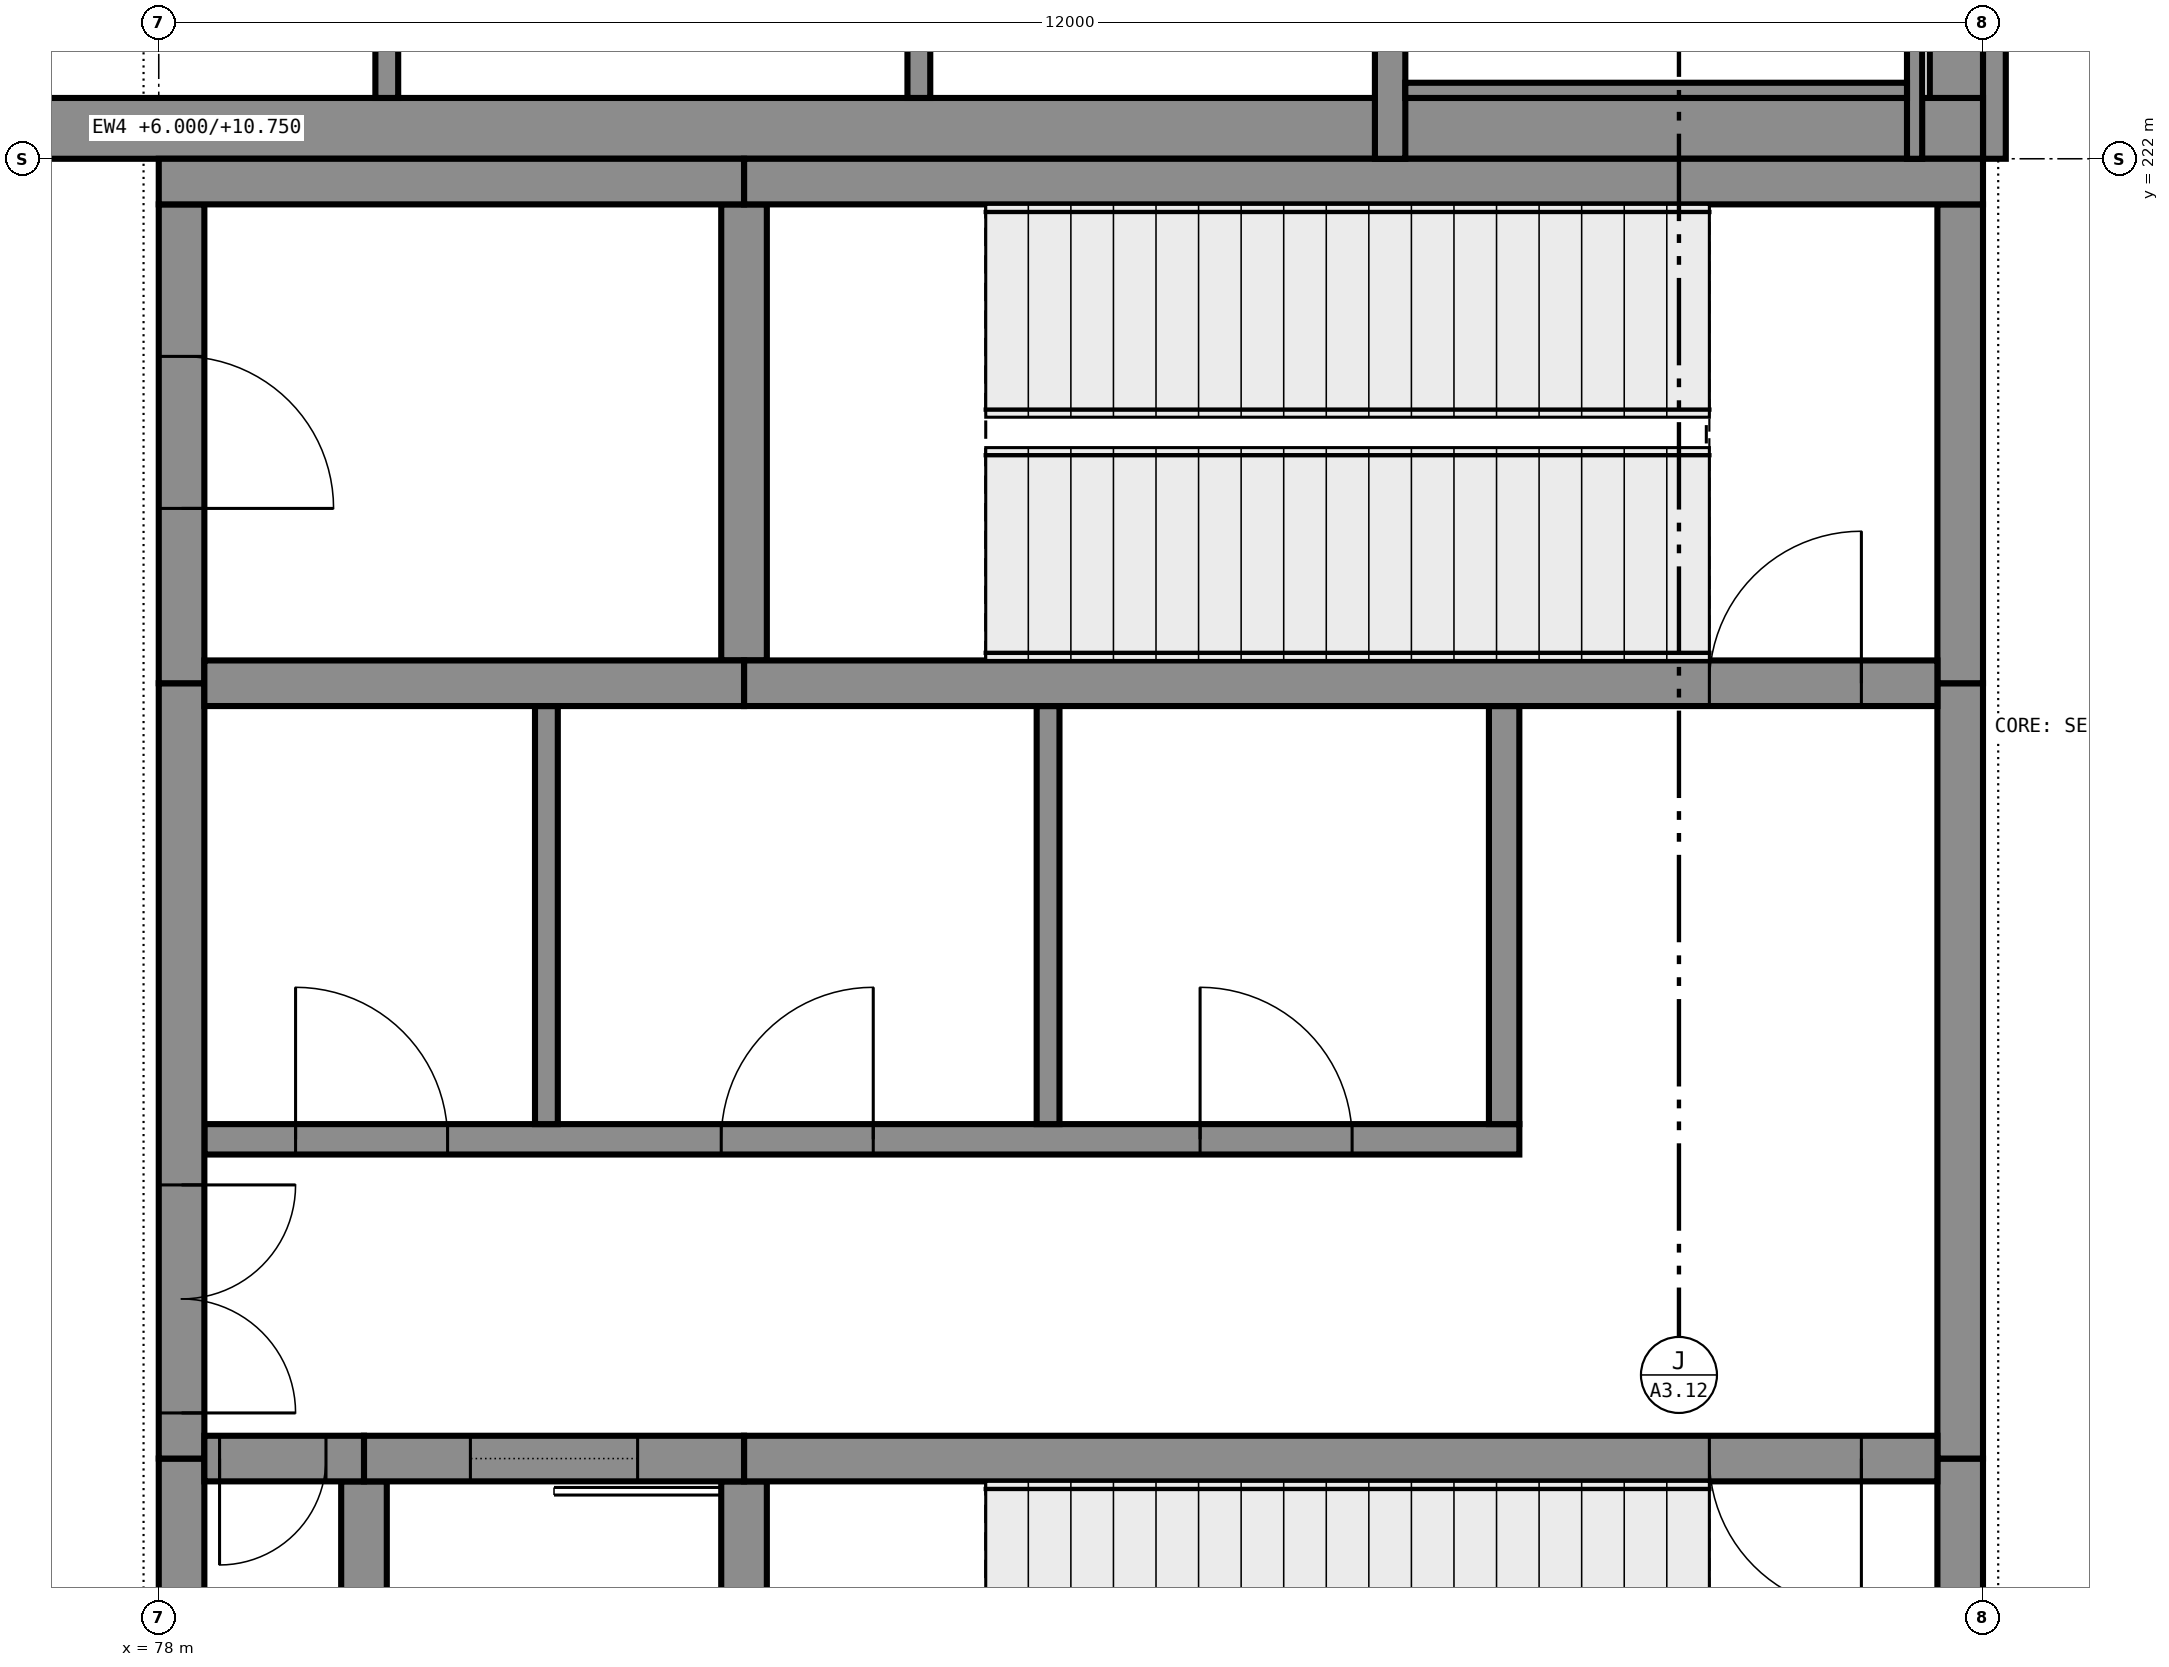
"""IFC4 building model, lengths in metres.
Left out: names, types, materials, properties, quantities, classifications, styles, units other than length and angle.
Written with IfcOpenShell. Run it as: python <this file> out.ifc"""

import sys

from ifc_helpers import new_model, si_unit, direction, frame, frame_2d, origin, place, context, subcontext, project, spatial, rectangle, extrude, element, fill, save


model = new_model("IFC4")
c1 = context("Model", 3, precision=1e-05, world=origin(), true_north=direction((0.0, 1.0)))
c2 = subcontext(c1, "Body", "Model", "MODEL_VIEW")
j1 = project(units=[si_unit("LENGTHUNIT", "METRE"), si_unit("PLANEANGLEUNIT", "RADIAN")], contexts=[c1])
p1 = place(None, origin())
s1 = spatial("IfcSite", under=j1, at=p1, CompositionType="ELEMENT")
p2 = place(p1, origin())
s2 = spatial("IfcBuilding", under=s1, at=p2, CompositionType="ELEMENT")
p3 = place(p2, frame((0.0, 0.0, 6.0)))
s3 = spatial("IfcBuildingStorey", under=s2, at=p3, CompositionType="ELEMENT", Elevation=6.0)
p4 = place(p3, frame((90.0, 221.85, 0.0), z_axis=(0.0, 0.0, 1.0), x_axis=(-1.0, 0.0, 0.0)))
e1 = element("IfcWall", 1, at=p4, inside=s3, PredefinedType="SHEAR", context=c2, shape_type="SweptSolid", body=[
    extrude(rectangle(XDim=8.15, YDim=0.3, at=frame_2d((4.075, 0.0))), origin(), (0.0, 0.0, 1.0), 5.75),
])
p5 = place(p3, frame((81.85, 221.85, 0.0), z_axis=(0.0, 0.0, 1.0), x_axis=(-1.0, 0.0, 0.0)))
e2 = element("IfcWall", 2, at=p5, inside=s3, PredefinedType="SHEAR", context=c2, shape_type="SweptSolid", body=[
    extrude(rectangle(XDim=3.85, YDim=0.3, at=frame_2d((1.925, 0.0))), origin(), (0.0, 0.0, 1.0), 5.75),
])
p6 = place(p3, frame((89.7, 213.45, 0.0), z_axis=(0.0, 0.0, 1.0), x_axis=(-1.0, 0.0, 0.0)))
e3 = element("IfcWall", 3, at=p6, inside=s3, PredefinedType="SHEAR", context=c2, shape_type="SweptSolid", body=[
    extrude(rectangle(XDim=7.85, YDim=0.3, at=frame_2d((3.925, 0.0))), origin(), (0.0, 0.0, 1.0), 5.75),
])
p7 = place(p6, frame((0.5, 0.0, 0.0)))
e4 = element("IfcOpeningElement", 4, at=p7, cuts=e3, PredefinedType="OPENING", context=c2, shape_type="SweptSolid", body=[
    extrude(rectangle(XDim=1.0, YDim=2.1, at=frame_2d((0.5, 1.05))), frame((0.0, 0.16, 0.0), z_axis=(0.0, -1.0, 0.0), x_axis=(1.0, 0.0, 0.0)), (0.0, 0.0, 1.0), 0.32),
])
p8 = place(p3, frame((81.85, 213.45, 0.0), z_axis=(0.0, 0.0, 1.0), x_axis=(-1.0, 0.0, 0.0)))
e5 = element("IfcWall", 5, at=p8, inside=s3, PredefinedType="SHEAR", context=c2, shape_type="SweptSolid", body=[
    extrude(rectangle(XDim=2.5, YDim=0.3, at=frame_2d((1.25, 0.0))), origin(), (0.0, 0.0, 1.0), 5.75),
])
p9 = place(p8, frame((0.7, 0.0, 0.0)))
e6 = element("IfcOpeningElement", 6, at=p9, cuts=e5, PredefinedType="OPENING", context=c2, shape_type="SweptSolid", body=[
    extrude(rectangle(XDim=1.1, YDim=2.1, at=frame_2d((0.55, 1.05))), frame((0.0, 0.16, 0.0), z_axis=(0.0, -1.0, 0.0), x_axis=(1.0, 0.0, 0.0)), (0.0, 0.0, 1.0), 0.32),
])
p10 = place(p3, frame((79.35, 213.45, 0.0), z_axis=(0.0, 0.0, 1.0), x_axis=(-1.0, 0.0, 0.0)))
e7 = element("IfcWall", 7, at=p10, inside=s3, PredefinedType="SHEAR", context=c2, shape_type="SweptSolid", body=[
    extrude(rectangle(XDim=1.05, YDim=0.3, at=frame_2d((0.525, 0.0))), origin(), (0.0, 0.0, 1.0), 5.75),
])
p11 = place(p10, frame((0.25, 0.0, 0.0)))
e8 = element("IfcOpeningElement", 8, at=p11, cuts=e7, PredefinedType="OPENING", context=c2, shape_type="SweptSolid", body=[
    extrude(rectangle(XDim=0.7, YDim=2.1, at=frame_2d((0.35, 1.05))), frame((0.0, 0.16, 0.0), z_axis=(0.0, -1.0, 0.0), x_axis=(1.0, 0.0, 0.0)), (0.0, 0.0, 1.0), 0.32),
])
p12 = place(p3, frame((89.7, 218.55, 0.0), z_axis=(0.0, 0.0, 1.0), x_axis=(-1.0, 0.0, 0.0)))
e9 = element("IfcWall", 9, at=p12, inside=s3, PredefinedType="SHEAR", context=c2, shape_type="SweptSolid", body=[
    extrude(rectangle(XDim=7.85, YDim=0.3, at=frame_2d((3.925, 0.0))), origin(), (0.0, 0.0, 1.0), 5.75),
])
p13 = place(p12, frame((0.5, 0.0, 0.0)))
e10 = element("IfcOpeningElement", 10, at=p13, cuts=e9, PredefinedType="OPENING", context=c2, shape_type="SweptSolid", body=[
    extrude(rectangle(XDim=1.0, YDim=2.1, at=frame_2d((0.5, 1.05))), frame((0.0, 0.16, 0.0), z_axis=(0.0, -1.0, 0.0), x_axis=(1.0, 0.0, 0.0)), (0.0, 0.0, 1.0), 0.32),
])
p14 = place(p3, frame((81.85, 218.55, 0.0), z_axis=(0.0, 0.0, 1.0), x_axis=(-1.0, 0.0, 0.0)))
e11 = element("IfcWall", 11, at=p14, inside=s3, PredefinedType="SHEAR", context=c2, shape_type="SweptSolid", body=[
    extrude(rectangle(XDim=3.55, YDim=0.3, at=frame_2d((1.775, 0.0))), origin(), (0.0, 0.0, 1.0), 5.75),
])
p15 = place(p3, frame((89.85, 210.0, 0.0), z_axis=(0.0, 0.0, 1.0), x_axis=(0.0, 1.0, 0.0)))
e12 = element("IfcWall", 12, at=p15, inside=s3, PredefinedType="SHEAR", context=c2, shape_type="SweptSolid", body=[
    extrude(rectangle(XDim=3.45, YDim=0.3, at=frame_2d((1.725, 0.0))), origin(), (0.0, 0.0, 1.0), 5.75),
])
p16 = place(p3, frame((89.85, 213.45, 0.0), z_axis=(0.0, 0.0, 1.0), x_axis=(0.0, 1.0, 0.0)))
e13 = element("IfcWall", 13, at=p16, inside=s3, PredefinedType="SHEAR", context=c2, shape_type="SweptSolid", body=[
    extrude(rectangle(XDim=5.1, YDim=0.3, at=frame_2d((2.55, 0.0))), origin(), (0.0, 0.0, 1.0), 5.75),
])
for number, where, z_axis, x_axis in (
    (14, (89.85, 218.55, 0.0), (0.0, 0.0, 1.0), (0.0, 1.0, 0.0)),
    (15, (78.15, 210.3, 0.0), (0.0, 0.0, 1.0), (0.0, 1.0, 0.0)),
):
    element("IfcWall", number, at=place(p3, frame(where, z_axis=z_axis, x_axis=x_axis)), inside=s3, PredefinedType="SHEAR", context=c2, shape_type="SweptSolid", body=[
        extrude(rectangle(XDim=3.15, YDim=0.3, at=frame_2d((1.575, 0.0))), origin(), (0.0, 0.0, 1.0), 5.75),
    ])
p17 = place(p3, frame((78.15, 213.45, 0.0), z_axis=(0.0, 0.0, 1.0), x_axis=(0.0, 1.0, 0.0)))
e16 = element("IfcWall", 16, at=p17, inside=s3, PredefinedType="SHEAR", context=c2, shape_type="SweptSolid", body=[
    extrude(rectangle(XDim=5.1, YDim=0.3, at=frame_2d((2.55, 0.0))), origin(), (0.0, 0.0, 1.0), 5.75),
])
p18 = place(p17, frame((0.3, 0.0, 0.0)))
e17 = element("IfcOpeningElement", 17, at=p18, cuts=e16, PredefinedType="OPENING", context=c2, shape_type="SweptSolid", body=[
    extrude(rectangle(XDim=1.5, YDim=2.1, at=frame_2d((0.75, 1.05))), frame((0.0, 0.16, 0.0), z_axis=(0.0, -1.0, 0.0), x_axis=(1.0, 0.0, 0.0)), (0.0, 0.0, 1.0), 0.32),
])
p19 = place(p3, frame((78.15, 218.55, 0.0), z_axis=(0.0, 0.0, 1.0), x_axis=(0.0, 1.0, 0.0)))
e18 = element("IfcWall", 18, at=p19, inside=s3, PredefinedType="SHEAR", context=c2, shape_type="SweptSolid", body=[
    extrude(rectangle(XDim=3.15, YDim=0.3, at=frame_2d((1.575, 0.0))), origin(), (0.0, 0.0, 1.0), 5.75),
])
p20 = place(p19, frame((1.15, 0.0, 0.0)))
e19 = element("IfcOpeningElement", 19, at=p20, cuts=e18, PredefinedType="OPENING", context=c2, shape_type="SweptSolid", body=[
    extrude(rectangle(XDim=1.0, YDim=2.1, at=frame_2d((0.5, 1.05))), frame((0.0, 0.16, 0.0), z_axis=(0.0, -1.0, 0.0), x_axis=(1.0, 0.0, 0.0)), (0.0, 0.0, 1.0), 0.32),
])
p21 = place(p3, frame((81.85, 210.0, 0.0), z_axis=(0.0, 0.0, 1.0), x_axis=(0.0, 1.0, 0.0)))
e20 = element("IfcWall", 20, at=p21, inside=s3, PredefinedType="SHEAR", context=c2, shape_type="SweptSolid", body=[
    extrude(rectangle(XDim=3.3, YDim=0.3, at=frame_2d((1.65, 0.0))), origin(), (0.0, 0.0, 1.0), 5.75),
])
for number, where, z_axis, x_axis in (
    (21, (81.85, 218.7, 0.0), (0.0, 0.0, 1.0), (0.0, 1.0, 0.0)),
    (22, (79.35, 210.3, 0.0), (0.0, 0.0, 1.0), (0.0, 1.0, 0.0)),
):
    element("IfcWall", number, at=place(p3, frame(where, z_axis=z_axis, x_axis=x_axis)), inside=s3, PredefinedType="SHEAR", context=c2, shape_type="SweptSolid", body=[
        extrude(rectangle(XDim=3.0, YDim=0.3, at=frame_2d((1.5, 0.0))), origin(), (0.0, 0.0, 1.0), 5.75),
    ])
p22 = place(p3, frame((86.1, 222.0, 0.0), z_axis=(0.0, 0.0, 1.0), x_axis=(0.0, 1.0, 0.0)))
e23 = element("IfcWall", 23, at=p22, inside=s3, PredefinedType="SHEAR", context=c2, shape_type="SweptSolid", body=[
    extrude(rectangle(XDim=7.5, YDim=0.2, at=frame_2d((3.75, 0.0))), origin(), (0.0, 0.0, 1.0), 6.0),
])
p23 = place(p3, frame((89.55, 229.7, 0.0), z_axis=(0.0, 0.0, 1.0), x_axis=(0.0, -1.0, 0.0)))
e24 = element("IfcWall", 24, at=p23, inside=s3, PredefinedType="SHEAR", context=c2, shape_type="SweptSolid", body=[
    extrude(rectangle(XDim=7.7, YDim=0.1, at=frame_2d((3.85, 0.0))), origin(), (0.0, 0.0, 1.0), 5.75),
])
p24 = place(p3, frame((89.5, 222.45, 0.0), z_axis=(0.0, 0.0, 1.0), x_axis=(-1.0, 0.0, 0.0)))
e25 = element("IfcWall", 25, at=p24, inside=s3, PredefinedType="SHEAR", context=c2, shape_type="SweptSolid", body=[
    extrude(rectangle(XDim=3.3, YDim=0.1, at=frame_2d((1.65, 0.0))), origin(), (0.0, 0.0, 1.0), 5.75),
])
p25 = place(p3, frame((66.5, 222.2, 0.0), z_axis=(0.0, 0.0, 1.0), x_axis=(1.0, 0.0, 0.0)))
e26 = element("IfcWall", 26, at=p25, inside=s3, PredefinedType="SOLIDWALL", context=c2, shape_type="SweptSolid", body=[
    extrude(rectangle(XDim=23.5, YDim=0.4, at=frame_2d((11.75, 0.0))), origin(), (0.0, 0.0, 1.0), 4.75),
])
p26 = place(p25, frame((4.6, 0.0, 0.0)))
e27 = element("IfcOpeningElement", 27, at=p26, cuts=e26, PredefinedType="OPENING", context=c2, shape_type="SweptSolid", body=[
    extrude(rectangle(XDim=1.8, YDim=2.1, at=frame_2d((0.9, 1.05))), frame((0.0, 0.21, 0.0), z_axis=(0.0, -1.0, 0.0), x_axis=(1.0, 0.0, 0.0)), (0.0, 0.0, 1.0), 0.42),
])
p27 = place(p3, frame((89.825, 222.0, 0.0), z_axis=(0.0, 0.0, 1.0), x_axis=(0.0, 1.0, 0.0)))
e28 = element("IfcWall", 28, at=p27, inside=s3, PredefinedType="STANDARD", context=c2, shape_type="SweptSolid", body=[
    extrude(rectangle(XDim=11.5, YDim=0.35, at=frame_2d((5.75, 0.0))), origin(), (0.0, 0.0, 1.0), 4.75),
])
p28 = place(p27, frame((4.55, 0.0, 0.6)))
e29 = element("IfcOpeningElement", 29, at=p28, cuts=e28, PredefinedType="OPENING", context=c2, shape_type="SweptSolid", body=[
    extrude(rectangle(XDim=2.4, YDim=2.4, at=frame_2d((1.2, 1.2))), frame((0.0, 0.185, 0.0), z_axis=(0.0, -1.0, 0.0), x_axis=(1.0, 0.0, 0.0)), (0.0, 0.0, 1.0), 0.37),
])
p29 = place(p3, frame((90.075, 222.0, 5.75), z_axis=(0.0, 0.0, 1.0), x_axis=(0.0, 1.0, 0.0)))
e30 = element("IfcWall", 30, at=p29, inside=s3, PredefinedType="STANDARD", context=c2, shape_type="SweptSolid", body=[
    extrude(rectangle(XDim=11.5, YDim=0.15, at=frame_2d((5.75, 0.0))), origin(), (0.0, 0.0, 1.0), 0.25),
])
p30 = place(p3, frame((78.3, 215.55, 0.0), z_axis=(0.0, 0.0, 1.0), x_axis=(1.0, 0.0, 0.0)))
e31 = element("IfcWall", 31, at=p30, inside=s3, PredefinedType="PARTITIONING", context=c2, shape_type="SweptSolid", body=[
    extrude(rectangle(XDim=8.65, YDim=0.2, at=frame_2d((4.325, 0.0))), origin(), (0.0, 0.0, 1.0), 5.75),
])
p31 = place(p30, frame((0.6, 0.0, 0.0)))
e32 = element("IfcOpeningElement", 32, at=p31, cuts=e31, PredefinedType="OPENING", context=c2, shape_type="SweptSolid", body=[
    extrude(rectangle(XDim=1.0, YDim=2.1, at=frame_2d((0.5, 1.05))), frame((0.0, 0.11, 0.0), z_axis=(0.0, -1.0, 0.0), x_axis=(1.0, 0.0, 0.0)), (0.0, 0.0, 1.0), 0.22),
])
p32 = place(p30, frame((3.4, 0.0, 0.0)))
e33 = element("IfcOpeningElement", 33, at=p32, cuts=e31, PredefinedType="OPENING", context=c2, shape_type="SweptSolid", body=[
    extrude(rectangle(XDim=1.0, YDim=2.1, at=frame_2d((0.5, 1.05))), frame((0.0, 0.11, 0.0), z_axis=(0.0, -1.0, 0.0), x_axis=(1.0, 0.0, 0.0)), (0.0, 0.0, 1.0), 0.22),
])
p33 = place(p30, frame((6.55, 0.0, 0.0)))
e34 = element("IfcOpeningElement", 34, at=p33, cuts=e31, PredefinedType="OPENING", context=c2, shape_type="SweptSolid", body=[
    extrude(rectangle(XDim=1.0, YDim=2.1, at=frame_2d((0.5, 1.05))), frame((0.0, 0.11, 0.0), z_axis=(0.0, -1.0, 0.0), x_axis=(1.0, 0.0, 0.0)), (0.0, 0.0, 1.0), 0.22),
])
for number, where, z_axis, x_axis in (
    (35, (80.55, 215.65, 0.0), (0.0, 0.0, 1.0), (0.0, 1.0, 0.0)),
    (36, (83.85, 215.65, 0.0), (0.0, 0.0, 1.0), (0.0, 1.0, 0.0)),
):
    element("IfcWall", number, at=place(p3, frame(where, z_axis=z_axis, x_axis=x_axis)), inside=s3, PredefinedType="PARTITIONING", context=c2, shape_type="SweptSolid", body=[
        extrude(rectangle(XDim=2.75, YDim=0.15, at=frame_2d((1.375, 0.0))), origin(), (0.0, 0.0, 1.0), 5.75),
    ])
p34 = place(p3, frame((86.85, 215.65, 0.0), z_axis=(0.0, 0.0, 1.0), x_axis=(0.0, 1.0, 0.0)))
e37 = element("IfcWall", 37, at=p34, inside=s3, PredefinedType="PARTITIONING", context=c2, shape_type="SweptSolid", body=[
    extrude(rectangle(XDim=2.75, YDim=0.2, at=frame_2d((1.375, 0.0))), origin(), (0.0, 0.0, 1.0), 5.75),
])
for number, where, z_axis, x_axis in (
    (38, (79.5, 222.4, 0.0), (0.0, 0.0, 1.0), (0.0, 1.0, 0.0)),
    (39, (83.0, 222.4, 0.0), (0.0, 0.0, 1.0), (0.0, 1.0, 0.0)),
):
    element("IfcWall", number, at=place(p3, frame(where, z_axis=z_axis, x_axis=x_axis)), inside=s3, PredefinedType="PARTITIONING", context=c2, shape_type="SweptSolid", body=[
        extrude(rectangle(XDim=7.225, YDim=0.15, at=frame_2d((3.613, 0.0))), origin(), (0.0, 0.0, 1.0), 5.75),
    ])
p35 = place(p11, origin())
e40 = element("IfcDoor", 40, at=p35, inside=s3, OperationType="SINGLE_SWING_LEFT", PredefinedType="DOOR", context=c2, shape_type="SweptSolid", body=[
    extrude(rectangle(XDim=0.7, YDim=2.1, at=frame_2d((0.35, 1.05))), frame((0.0, 0.025, 0.0), z_axis=(0.0, -1.0, 0.0), x_axis=(1.0, 0.0, 0.0)), (0.0, 0.0, 1.0), 0.05),
])
fill(e8, e40)
p36 = place(p9, origin())
e41 = element("IfcDoor", 41, at=p36, inside=s3, OperationType="SLIDING_TO_LEFT", PredefinedType="DOOR", context=c2, shape_type="SweptSolid", body=[
    extrude(rectangle(XDim=1.1, YDim=2.1, at=frame_2d((0.55, 1.05))), frame((0.0, 0.025, 0.0), z_axis=(0.0, -1.0, 0.0), x_axis=(1.0, 0.0, 0.0)), (0.0, 0.0, 1.0), 0.05),
])
fill(e6, e41)
p37 = place(p7, origin())
e42 = element("IfcDoor", 42, at=p37, inside=s3, OperationType="SINGLE_SWING_RIGHT", PredefinedType="DOOR", context=c2, shape_type="SweptSolid", body=[
    extrude(rectangle(XDim=1.0, YDim=2.1, at=frame_2d((0.5, 1.05))), frame((0.0, 0.025, 0.0), z_axis=(0.0, -1.0, 0.0), x_axis=(1.0, 0.0, 0.0)), (0.0, 0.0, 1.0), 0.05),
])
fill(e4, e42)
p38 = place(p18, frame((1.5, 0.0, 0.0), z_axis=(0.0, 0.0, 1.0), x_axis=(-1.0, 0.0, 0.0)))
e43 = element("IfcDoor", 43, at=p38, inside=s3, OperationType="DOUBLE_DOOR_SINGLE_SWING", PredefinedType="DOOR", context=c2, shape_type="SweptSolid", body=[
    extrude(rectangle(XDim=1.5, YDim=2.1, at=frame_2d((0.75, 1.05))), frame((0.0, 0.025, 0.0), z_axis=(0.0, -1.0, 0.0), x_axis=(1.0, 0.0, 0.0)), (0.0, 0.0, 1.0), 0.05),
])
fill(e17, e43)
p39 = place(p31, origin())
e44 = element("IfcDoor", 44, at=p39, inside=s3, OperationType="SINGLE_SWING_RIGHT", PredefinedType="DOOR", context=c2, shape_type="SweptSolid", body=[
    extrude(rectangle(XDim=1.0, YDim=2.1, at=frame_2d((0.5, 1.05))), frame((0.0, 0.025, 0.0), z_axis=(0.0, -1.0, 0.0), x_axis=(1.0, 0.0, 0.0)), (0.0, 0.0, 1.0), 0.05),
])
fill(e32, e44)
p40 = place(p32, origin())
e45 = element("IfcDoor", 45, at=p40, inside=s3, OperationType="SINGLE_SWING_LEFT", PredefinedType="DOOR", context=c2, shape_type="SweptSolid", body=[
    extrude(rectangle(XDim=1.0, YDim=2.1, at=frame_2d((0.5, 1.05))), frame((0.0, 0.025, 0.0), z_axis=(0.0, -1.0, 0.0), x_axis=(1.0, 0.0, 0.0)), (0.0, 0.0, 1.0), 0.05),
])
fill(e33, e45)
p41 = place(p33, origin())
e46 = element("IfcDoor", 46, at=p41, inside=s3, OperationType="SINGLE_SWING_RIGHT", PredefinedType="DOOR", context=c2, shape_type="SweptSolid", body=[
    extrude(rectangle(XDim=1.0, YDim=2.1, at=frame_2d((0.5, 1.05))), frame((0.0, 0.025, 0.0), z_axis=(0.0, -1.0, 0.0), x_axis=(1.0, 0.0, 0.0)), (0.0, 0.0, 1.0), 0.05),
])
fill(e34, e46)
p42 = place(p13, frame((1.0, 0.0, 0.0), z_axis=(0.0, 0.0, 1.0), x_axis=(-1.0, 0.0, 0.0)))
e47 = element("IfcDoor", 47, at=p42, inside=s3, OperationType="SINGLE_SWING_LEFT", PredefinedType="DOOR", context=c2, shape_type="SweptSolid", body=[
    extrude(rectangle(XDim=1.0, YDim=2.1, at=frame_2d((0.5, 1.05))), frame((0.0, 0.025, 0.0), z_axis=(0.0, -1.0, 0.0), x_axis=(1.0, 0.0, 0.0)), (0.0, 0.0, 1.0), 0.05),
])
fill(e10, e47)
p43 = place(p20, frame((1.0, 0.0, 0.0), z_axis=(0.0, 0.0, 1.0), x_axis=(-1.0, 0.0, 0.0)))
e48 = element("IfcDoor", 48, at=p43, inside=s3, OperationType="SINGLE_SWING_LEFT", PredefinedType="DOOR", context=c2, shape_type="SweptSolid", body=[
    extrude(rectangle(XDim=1.0, YDim=2.1, at=frame_2d((0.5, 1.05))), frame((0.0, 0.025, 0.0), z_axis=(0.0, -1.0, 0.0), x_axis=(1.0, 0.0, 0.0)), (0.0, 0.0, 1.0), 0.05),
])
fill(e19, e48)
save(model, sys.argv[1])
